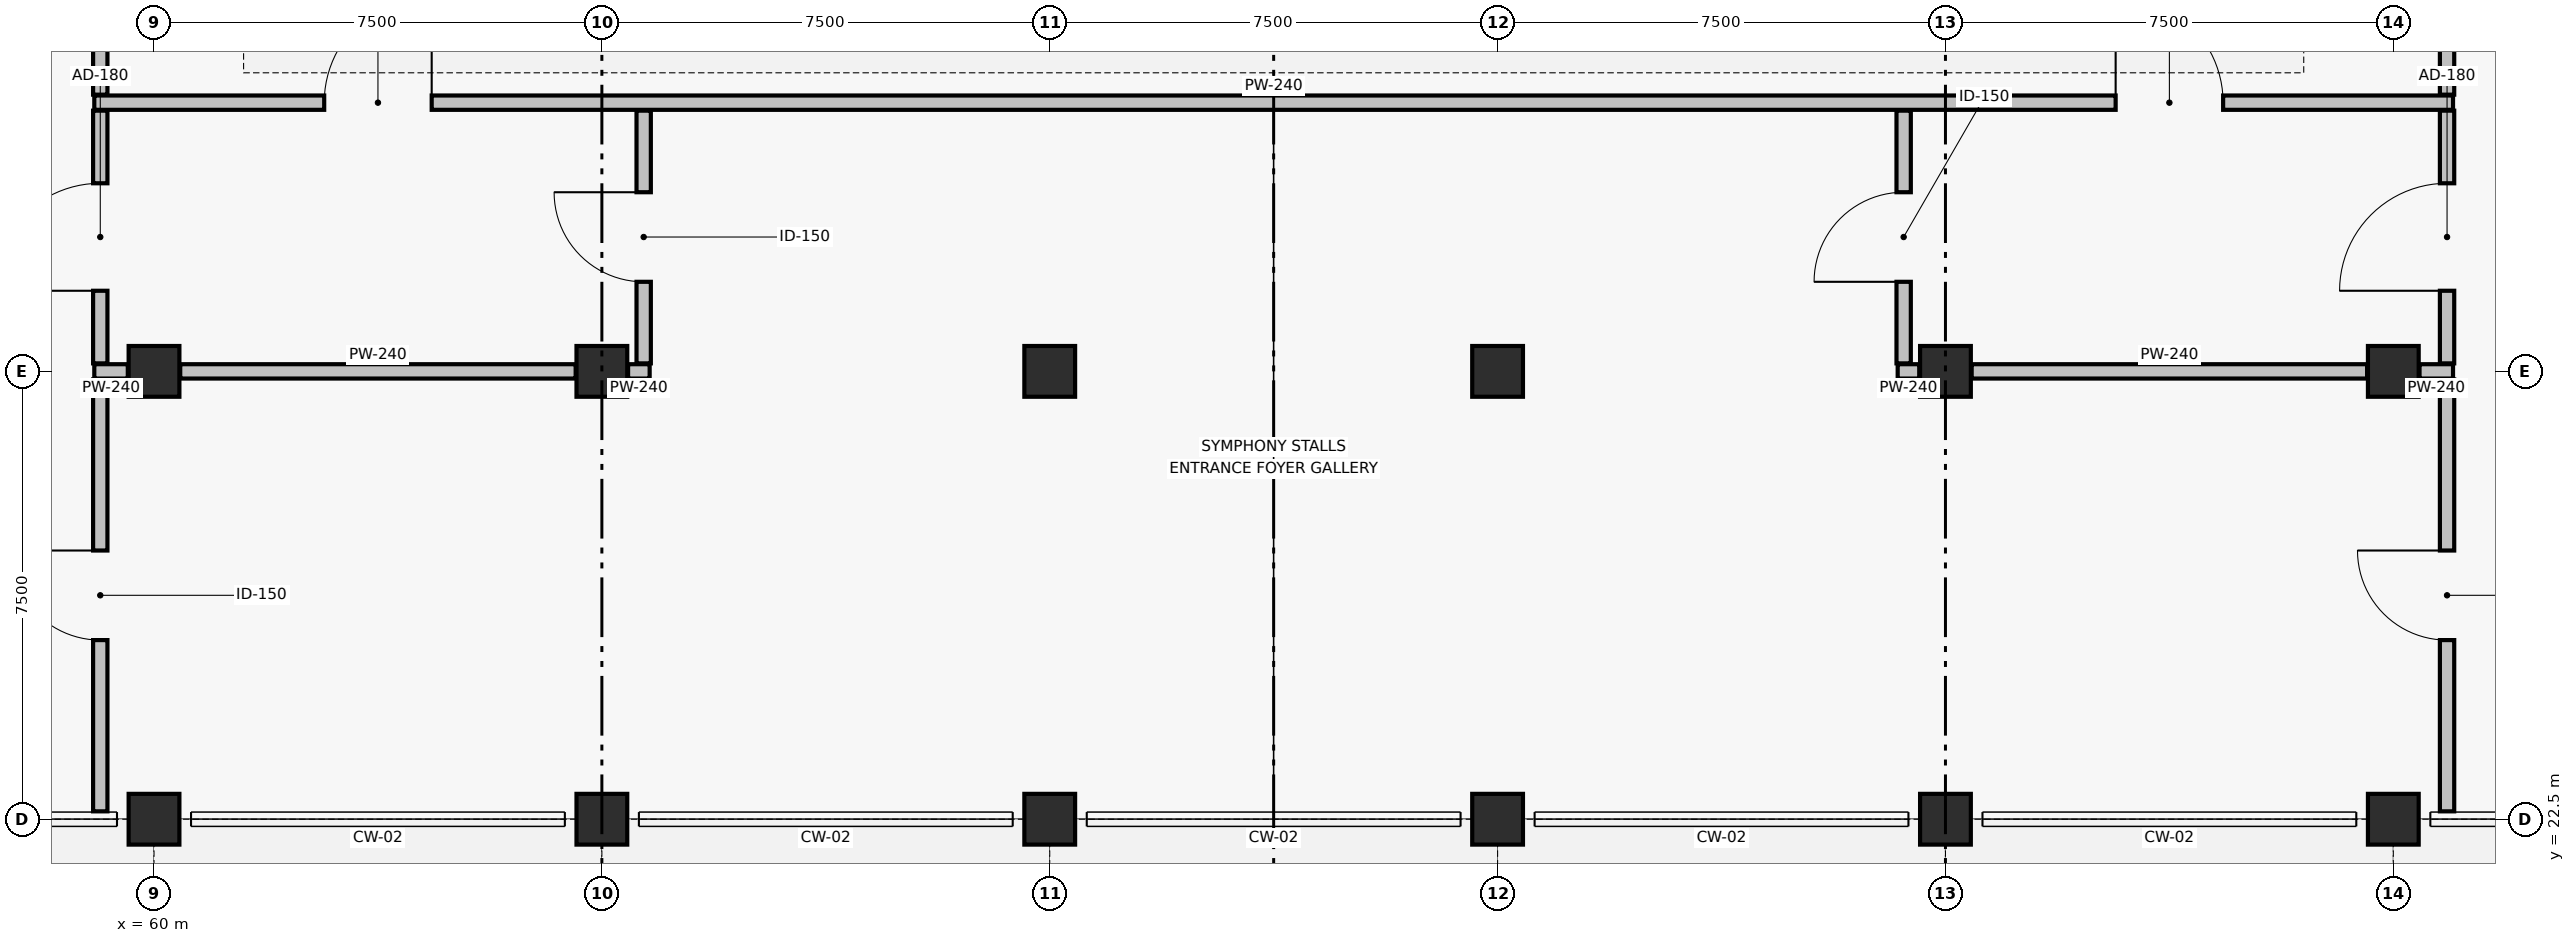
"""IFC4 building model, lengths in metres.
Left out: names, types, materials, properties, quantities, classifications, styles, units other than length and angle.
Written with IfcOpenShell. Run it as: python <this file> out.ifc"""

import sys

from ifc_helpers import new_model, si_unit, direction, frame, frame_2d, origin, origin_2d, place, context, subcontext, project, spatial, rectangle, extrude, element, fill, save


model = new_model("IFC4")
c1 = context("Model", 3, precision=1e-05, world=origin(), true_north=direction((0.0, 1.0)))
c2 = subcontext(c1, "Body", "Model", "MODEL_VIEW")
j1 = project(units=[si_unit("LENGTHUNIT", "METRE"), si_unit("PLANEANGLEUNIT", "RADIAN")], contexts=[c1])
p1 = place(None, origin())
s1 = spatial("IfcSite", under=j1, at=p1, CompositionType="ELEMENT")
p2 = place(p1, origin())
s2 = spatial("IfcBuilding", under=s1, at=p2, CompositionType="ELEMENT")
p3 = place(p2, frame((0.0, 0.0, 4.8)))
s3 = spatial("IfcBuildingStorey", under=s2, at=p3, CompositionType="ELEMENT", Elevation=4.8)
for number, where, z_axis, x_axis in (
    (1, (60.0, 22.5, 0.0), (0.0, 0.0, 1.0), (1.0, 0.0, 0.0)),
    (2, (60.0, 30.0, 0.0), (0.0, 0.0, 1.0), (1.0, 0.0, 0.0)),
    (3, (67.5, 22.5, 0.0), (0.0, 0.0, 1.0), (1.0, 0.0, 0.0)),
    (4, (67.5, 30.0, 0.0), (0.0, 0.0, 1.0), (1.0, 0.0, 0.0)),
    (5, (75.0, 22.5, 0.0), (0.0, 0.0, 1.0), (1.0, 0.0, 0.0)),
    (6, (75.0, 30.0, 0.0), (0.0, 0.0, 1.0), (1.0, 0.0, 0.0)),
    (7, (82.5, 22.5, 0.0), (0.0, 0.0, 1.0), (1.0, 0.0, 0.0)),
    (8, (82.5, 30.0, 0.0), (0.0, 0.0, 1.0), (1.0, 0.0, 0.0)),
    (9, (90.0, 22.5, 0.0), (0.0, 0.0, 1.0), (1.0, 0.0, 0.0)),
    (10, (90.0, 30.0, 0.0), (0.0, 0.0, 1.0), (1.0, 0.0, 0.0)),
    (11, (97.5, 22.5, 0.0), (0.0, 0.0, 1.0), (1.0, 0.0, 0.0)),
    (12, (97.5, 30.0, 0.0), (0.0, 0.0, 1.0), (1.0, 0.0, 0.0)),
):
    element("IfcColumn", number, at=place(p3, frame(where, z_axis=z_axis, x_axis=x_axis)), inside=s3, PredefinedType="COLUMN", context=c2, shape_type="SweptSolid", body=[
        extrude(rectangle(XDim=0.85, YDim=0.85, at=origin_2d()), origin(), (0.0, 0.0, 1.0), 4.2),
    ])
p4 = place(p3, frame((59.0, 30.0, 0.0), z_axis=(0.0, 0.0, 1.0), x_axis=(1.0, 0.0, 0.0)))
e13 = element("IfcWall", 13, at=p4, inside=s3, PredefinedType="PARTITIONING", context=c2, shape_type="SweptSolid", body=[
    extrude(rectangle(XDim=0.561, YDim=0.24, at=frame_2d((0.281, 0.0))), origin(), (0.0, 0.0, 1.0), 2.69),
])
p5 = place(p3, frame((60.439, 30.0, 0.0), z_axis=(0.0, 0.0, 1.0), x_axis=(1.0, 0.0, 0.0)))
e14 = element("IfcWall", 14, at=p5, inside=s3, PredefinedType="PARTITIONING", context=c2, shape_type="SweptSolid", body=[
    extrude(rectangle(XDim=6.622, YDim=0.24, at=frame_2d((3.311, 0.0))), origin(), (0.0, 0.0, 1.0), 2.69),
])
p6 = place(p3, frame((67.939, 30.0, 0.0), z_axis=(0.0, 0.0, 1.0), x_axis=(1.0, 0.0, 0.0)))
e15 = element("IfcWall", 15, at=p6, inside=s3, PredefinedType="PARTITIONING", context=c2, shape_type="SweptSolid", body=[
    extrude(rectangle(XDim=0.361, YDim=0.24, at=frame_2d((0.181, 0.0))), origin(), (0.0, 0.0, 1.0), 2.99),
])
p7 = place(p3, frame((89.2, 30.0, 0.0), z_axis=(0.0, 0.0, 1.0), x_axis=(1.0, 0.0, 0.0)))
e16 = element("IfcWall", 16, at=p7, inside=s3, PredefinedType="PARTITIONING", context=c2, shape_type="SweptSolid", body=[
    extrude(rectangle(XDim=0.361, YDim=0.24, at=frame_2d((0.181, 0.0))), origin(), (0.0, 0.0, 1.0), 3.04),
])
p8 = place(p3, frame((90.439, 30.0, 0.0), z_axis=(0.0, 0.0, 1.0), x_axis=(1.0, 0.0, 0.0)))
e17 = element("IfcWall", 17, at=p8, inside=s3, PredefinedType="PARTITIONING", context=c2, shape_type="SweptSolid", body=[
    extrude(rectangle(XDim=6.622, YDim=0.24, at=frame_2d((3.311, 0.0))), origin(), (0.0, 0.0, 1.0), 2.69),
])
p9 = place(p3, frame((97.939, 30.0, 0.0), z_axis=(0.0, 0.0, 1.0), x_axis=(1.0, 0.0, 0.0)))
e18 = element("IfcWall", 18, at=p9, inside=s3, PredefinedType="PARTITIONING", context=c2, shape_type="SweptSolid", body=[
    extrude(rectangle(XDim=0.561, YDim=0.24, at=frame_2d((0.281, 0.0))), origin(), (0.0, 0.0, 1.0), 2.69),
])
p10 = place(p3, frame((59.0, 34.5, 0.0), z_axis=(0.0, 0.0, 1.0), x_axis=(1.0, 0.0, 0.0)))
e19 = element("IfcWall", 19, at=p10, inside=s3, PredefinedType="PARTITIONING", context=c2, shape_type="SweptSolid", body=[
    extrude(rectangle(XDim=39.5, YDim=0.24, at=frame_2d((19.75, 0.0))), origin(), (0.0, 0.0, 1.0), 2.69),
])
p11 = place(p10, frame((3.85, 0.0, 0.0)))
e20 = element("IfcOpeningElement", 20, at=p11, cuts=e19, PredefinedType="OPENING", context=c2, shape_type="SweptSolid", body=[
    extrude(rectangle(XDim=1.8, YDim=2.16, at=frame_2d((0.9, 1.08))), frame((0.0, 0.13, 0.0), z_axis=(0.0, -1.0, 0.0), x_axis=(1.0, 0.0, 0.0)), (0.0, 0.0, 1.0), 0.26),
])
p12 = place(p10, frame((33.85, 0.0, 0.0)))
e21 = element("IfcOpeningElement", 21, at=p12, cuts=e19, PredefinedType="OPENING", context=c2, shape_type="SweptSolid", body=[
    extrude(rectangle(XDim=1.8, YDim=2.16, at=frame_2d((0.9, 1.08))), frame((0.0, 0.13, 0.0), z_axis=(0.0, -1.0, 0.0), x_axis=(1.0, 0.0, 0.0)), (0.0, 0.0, 1.0), 0.26),
])
p13 = place(p3, frame((68.2, 30.134, 0.0), z_axis=(0.0, 0.0, 1.0), x_axis=(0.0, 1.0, 0.0)))
e22 = element("IfcWall", 22, at=p13, inside=s3, PredefinedType="PARTITIONING", context=c2, shape_type="SweptSolid", body=[
    extrude(rectangle(XDim=4.232, YDim=0.24, at=frame_2d((2.116, 0.0))), origin(), (0.0, 0.0, 1.0), 2.99),
])
p14 = place(p13, frame((1.366, 0.0, 0.0)))
e23 = element("IfcOpeningElement", 23, at=p14, cuts=e22, PredefinedType="OPENING", context=c2, shape_type="SweptSolid", body=[
    extrude(rectangle(XDim=1.5, YDim=2.16, at=frame_2d((0.75, 1.08))), frame((0.0, 0.13, 0.0), z_axis=(0.0, -1.0, 0.0), x_axis=(1.0, 0.0, 0.0)), (0.0, 0.0, 1.0), 0.26),
])
p15 = place(p3, frame((89.3, 30.134, 0.0), z_axis=(0.0, 0.0, 1.0), x_axis=(0.0, 1.0, 0.0)))
e24 = element("IfcWall", 24, at=p15, inside=s3, PredefinedType="PARTITIONING", context=c2, shape_type="SweptSolid", body=[
    extrude(rectangle(XDim=4.232, YDim=0.24, at=frame_2d((2.116, 0.0))), origin(), (0.0, 0.0, 1.0), 3.04),
])
p16 = place(p15, frame((1.366, 0.0, 0.0)))
e25 = element("IfcOpeningElement", 25, at=p16, cuts=e24, PredefinedType="OPENING", context=c2, shape_type="SweptSolid", body=[
    extrude(rectangle(XDim=1.5, YDim=2.16, at=frame_2d((0.75, 1.08))), frame((0.0, 0.13, 0.0), z_axis=(0.0, -1.0, 0.0), x_axis=(1.0, 0.0, 0.0)), (0.0, 0.0, 1.0), 0.26),
])
p17 = place(p3, frame((59.1, 22.632, 0.0), z_axis=(0.0, 0.0, 1.0), x_axis=(0.0, 1.0, 0.0)))
e26 = element("IfcWall", 26, at=p17, inside=s3, PredefinedType="PARTITIONING", context=c2, shape_type="SweptSolid", body=[
    extrude(rectangle(XDim=7.234, YDim=0.24, at=frame_2d((3.617, 0.0))), origin(), (0.0, 0.0, 1.0), 2.94),
])
p18 = place(p17, frame((2.868, 0.0, 0.0)))
e27 = element("IfcOpeningElement", 27, at=p18, cuts=e26, PredefinedType="OPENING", context=c2, shape_type="SweptSolid", body=[
    extrude(rectangle(XDim=1.5, YDim=2.16, at=frame_2d((0.75, 1.08))), frame((0.0, 0.13, 0.0), z_axis=(0.0, -1.0, 0.0), x_axis=(1.0, 0.0, 0.0)), (0.0, 0.0, 1.0), 0.26),
])
p19 = place(p3, frame((59.1, 30.134, 0.0), z_axis=(0.0, 0.0, 1.0), x_axis=(0.0, 1.0, 0.0)))
e28 = element("IfcWall", 28, at=p19, inside=s3, PredefinedType="PARTITIONING", context=c2, shape_type="SweptSolid", body=[
    extrude(rectangle(XDim=4.232, YDim=0.24, at=frame_2d((2.116, 0.0))), origin(), (0.0, 0.0, 1.0), 2.94),
])
p20 = place(p19, frame((1.216, 0.0, 0.0)))
e29 = element("IfcOpeningElement", 29, at=p20, cuts=e28, PredefinedType="OPENING", context=c2, shape_type="SweptSolid", body=[
    extrude(rectangle(XDim=1.8, YDim=2.16, at=frame_2d((0.9, 1.08))), frame((0.0, 0.13, 0.0), z_axis=(0.0, -1.0, 0.0), x_axis=(1.0, 0.0, 0.0)), (0.0, 0.0, 1.0), 0.26),
])
p21 = place(p3, frame((59.1, 34.634, 0.0), z_axis=(0.0, 0.0, 1.0), x_axis=(0.0, 1.0, 0.0)))
e30 = element("IfcWall", 30, at=p21, inside=s3, PredefinedType="PARTITIONING", context=c2, shape_type="SweptSolid", body=[
    extrude(rectangle(XDim=2.732, YDim=0.24, at=frame_2d((1.366, 0.0))), origin(), (0.0, 0.0, 1.0), 2.99),
])
p22 = place(p3, frame((98.4, 22.632, 0.0), z_axis=(0.0, 0.0, 1.0), x_axis=(0.0, 1.0, 0.0)))
e31 = element("IfcWall", 31, at=p22, inside=s3, PredefinedType="PARTITIONING", context=c2, shape_type="SweptSolid", body=[
    extrude(rectangle(XDim=7.234, YDim=0.24, at=frame_2d((3.617, 0.0))), origin(), (0.0, 0.0, 1.0), 2.84),
])
p23 = place(p22, frame((2.868, 0.0, 0.0)))
e32 = element("IfcOpeningElement", 32, at=p23, cuts=e31, PredefinedType="OPENING", context=c2, shape_type="SweptSolid", body=[
    extrude(rectangle(XDim=1.5, YDim=2.16, at=frame_2d((0.75, 1.08))), frame((0.0, 0.13, 0.0), z_axis=(0.0, -1.0, 0.0), x_axis=(1.0, 0.0, 0.0)), (0.0, 0.0, 1.0), 0.26),
])
p24 = place(p3, frame((98.4, 30.134, 0.0), z_axis=(0.0, 0.0, 1.0), x_axis=(0.0, 1.0, 0.0)))
e33 = element("IfcWall", 33, at=p24, inside=s3, PredefinedType="PARTITIONING", context=c2, shape_type="SweptSolid", body=[
    extrude(rectangle(XDim=4.232, YDim=0.24, at=frame_2d((2.116, 0.0))), origin(), (0.0, 0.0, 1.0), 2.84),
])
p25 = place(p24, frame((1.216, 0.0, 0.0)))
e34 = element("IfcOpeningElement", 34, at=p25, cuts=e33, PredefinedType="OPENING", context=c2, shape_type="SweptSolid", body=[
    extrude(rectangle(XDim=1.8, YDim=2.16, at=frame_2d((0.9, 1.08))), frame((0.0, 0.13, 0.0), z_axis=(0.0, -1.0, 0.0), x_axis=(1.0, 0.0, 0.0)), (0.0, 0.0, 1.0), 0.26),
])
p26 = place(p3, frame((98.4, 34.634, 0.0), z_axis=(0.0, 0.0, 1.0), x_axis=(0.0, 1.0, 0.0)))
e35 = element("IfcWall", 35, at=p26, inside=s3, PredefinedType="PARTITIONING", context=c2, shape_type="SweptSolid", body=[
    extrude(rectangle(XDim=2.732, YDim=0.24, at=frame_2d((1.366, 0.0))), origin(), (0.0, 0.0, 1.0), 3.09),
])
p27 = place(p11, origin())
e36 = element("IfcDoor", 36, at=p27, inside=s3, OperationType="SINGLE_SWING_RIGHT", PredefinedType="DOOR", context=c2, shape_type="SweptSolid", body=[
    extrude(rectangle(XDim=1.8, YDim=2.16, at=frame_2d((0.9, 1.08))), frame((0.0, 0.025, 0.0), z_axis=(0.0, -1.0, 0.0), x_axis=(1.0, 0.0, 0.0)), (0.0, 0.0, 1.0), 0.05),
])
fill(e20, e36)
p28 = place(p12, origin())
e37 = element("IfcDoor", 37, at=p28, inside=s3, OperationType="SINGLE_SWING_LEFT", PredefinedType="DOOR", context=c2, shape_type="SweptSolid", body=[
    extrude(rectangle(XDim=1.8, YDim=2.16, at=frame_2d((0.9, 1.08))), frame((0.0, 0.025, 0.0), z_axis=(0.0, -1.0, 0.0), x_axis=(1.0, 0.0, 0.0)), (0.0, 0.0, 1.0), 0.05),
])
fill(e21, e37)
p29 = place(p14, origin())
e38 = element("IfcDoor", 38, at=p29, inside=s3, OperationType="SINGLE_SWING_RIGHT", PredefinedType="DOOR", context=c2, shape_type="SweptSolid", body=[
    extrude(rectangle(XDim=1.5, YDim=2.16, at=frame_2d((0.75, 1.08))), frame((0.0, 0.025, 0.0), z_axis=(0.0, -1.0, 0.0), x_axis=(1.0, 0.0, 0.0)), (0.0, 0.0, 1.0), 0.05),
])
fill(e23, e38)
p30 = place(p16, origin())
e39 = element("IfcDoor", 39, at=p30, inside=s3, OperationType="SINGLE_SWING_LEFT", PredefinedType="DOOR", context=c2, shape_type="SweptSolid", body=[
    extrude(rectangle(XDim=1.5, YDim=2.16, at=frame_2d((0.75, 1.08))), frame((0.0, 0.025, 0.0), z_axis=(0.0, -1.0, 0.0), x_axis=(1.0, 0.0, 0.0)), (0.0, 0.0, 1.0), 0.05),
])
fill(e25, e39)
p31 = place(p18, origin())
e40 = element("IfcDoor", 40, at=p31, inside=s3, OperationType="SINGLE_SWING_RIGHT", PredefinedType="DOOR", context=c2, shape_type="SweptSolid", body=[
    extrude(rectangle(XDim=1.5, YDim=2.16, at=frame_2d((0.75, 1.08))), frame((0.0, 0.025, 0.0), z_axis=(0.0, -1.0, 0.0), x_axis=(1.0, 0.0, 0.0)), (0.0, 0.0, 1.0), 0.05),
])
fill(e27, e40)
p32 = place(p20, origin())
e41 = element("IfcDoor", 41, at=p32, inside=s3, OperationType="SINGLE_SWING_LEFT", PredefinedType="DOOR", context=c2, shape_type="SweptSolid", body=[
    extrude(rectangle(XDim=1.8, YDim=2.16, at=frame_2d((0.9, 1.08))), frame((0.0, 0.025, 0.0), z_axis=(0.0, -1.0, 0.0), x_axis=(1.0, 0.0, 0.0)), (0.0, 0.0, 1.0), 0.05),
])
fill(e29, e41)
p33 = place(p23, origin())
e42 = element("IfcDoor", 42, at=p33, inside=s3, OperationType="SINGLE_SWING_RIGHT", PredefinedType="DOOR", context=c2, shape_type="SweptSolid", body=[
    extrude(rectangle(XDim=1.5, YDim=2.16, at=frame_2d((0.75, 1.08))), frame((0.0, 0.025, 0.0), z_axis=(0.0, -1.0, 0.0), x_axis=(1.0, 0.0, 0.0)), (0.0, 0.0, 1.0), 0.05),
])
fill(e32, e42)
p34 = place(p25, origin())
e43 = element("IfcDoor", 43, at=p34, inside=s3, OperationType="SINGLE_SWING_LEFT", PredefinedType="DOOR", context=c2, shape_type="SweptSolid", body=[
    extrude(rectangle(XDim=1.8, YDim=2.16, at=frame_2d((0.9, 1.08))), frame((0.0, 0.025, 0.0), z_axis=(0.0, -1.0, 0.0), x_axis=(1.0, 0.0, 0.0)), (0.0, 0.0, 1.0), 0.05),
])
fill(e34, e43)
save(model, sys.argv[1])
